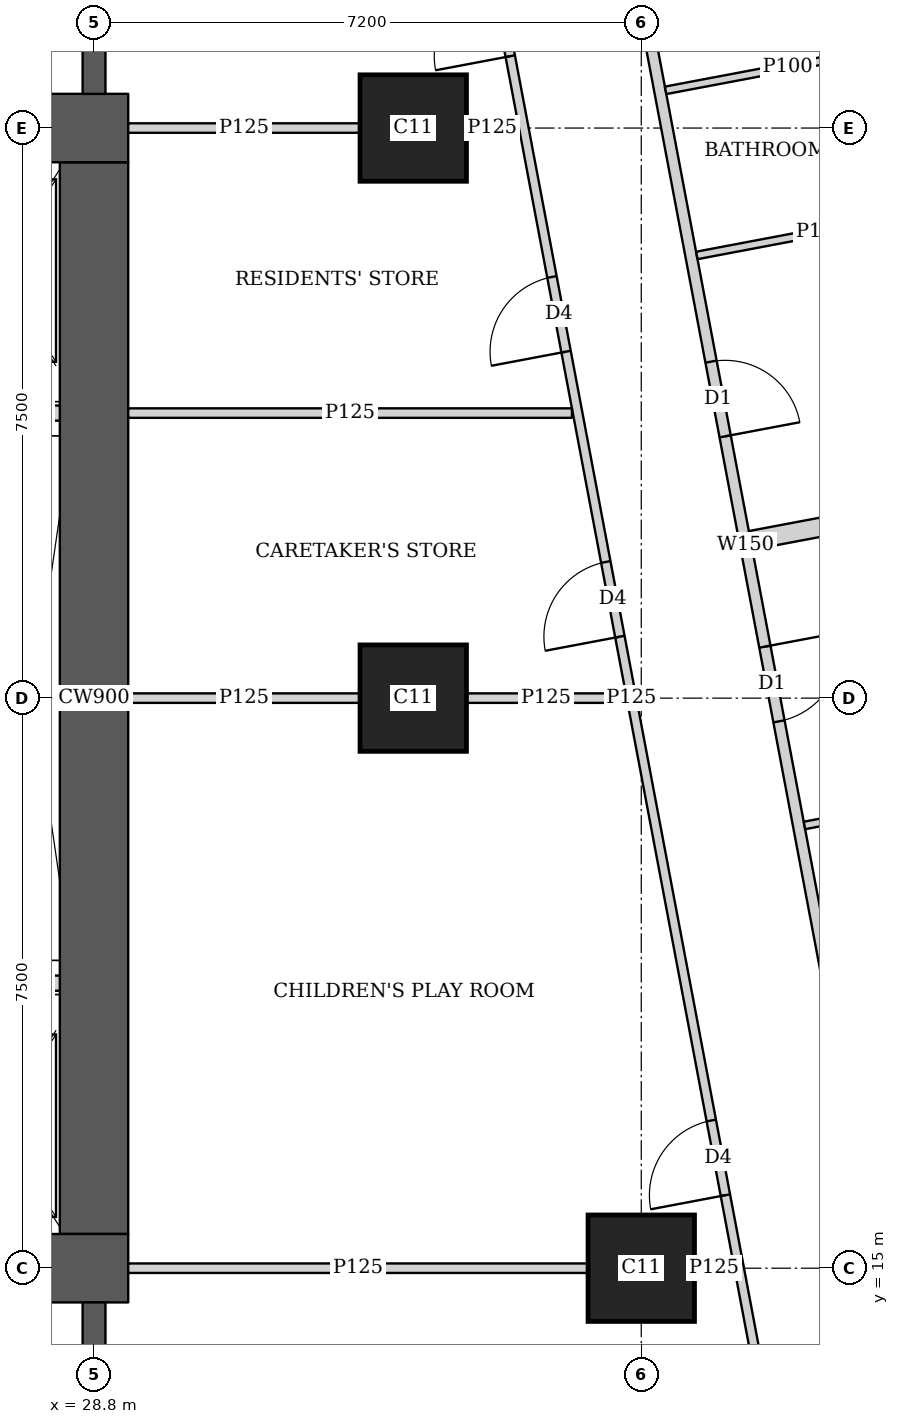
"""IFC4 building model, lengths in metres.
Left out: names, types, materials, properties, quantities, classifications, styles, units other than length and angle.
Written with IfcOpenShell. Run it as: python <this file> out.ifc"""

import sys

from ifc_helpers import new_model, si_unit, direction, frame, frame_2d, origin, origin_2d, place, context, subcontext, project, spatial, rectangle, extrude, element, fill, save


model = new_model("IFC4")
c1 = context("Model", 3, precision=1e-05, world=origin(), true_north=direction((0.0, 1.0)))
c2 = subcontext(c1, "Body", "Model", "MODEL_VIEW")
j1 = project(units=[si_unit("LENGTHUNIT", "METRE"), si_unit("PLANEANGLEUNIT", "RADIAN")], contexts=[c1])
p1 = place(None, origin())
s1 = spatial("IfcSite", under=j1, at=p1, CompositionType="ELEMENT")
p2 = place(p1, origin())
s2 = spatial("IfcBuilding", under=s1, at=p2, CompositionType="ELEMENT")
p3 = place(p2, frame((0.0, 0.0, 266.6)))
s3 = spatial("IfcBuildingStorey", under=s2, at=p3, CompositionType="ELEMENT", Elevation=266.6)
for number, where, z_axis, x_axis in (
    (1, (36.0, 15.0, 0.0), (0.0, 0.0, 1.0), (1.0, 0.0, 0.0)),
    (2, (33.0, 22.5, 0.0), (0.0, 0.0, 1.0), (1.0, 0.0, 0.0)),
    (3, (33.0, 30.0, 0.0), (0.0, 0.0, 1.0), (1.0, 0.0, 0.0)),
):
    element("IfcColumn", number, at=place(p3, frame(where, z_axis=z_axis, x_axis=x_axis)), inside=s3, PredefinedType="COLUMN", context=c2, shape_type="SweptSolid", body=[
        extrude(rectangle(XDim=1.4, YDim=1.4, at=origin_2d()), origin(), (0.0, 0.0, 1.0), 3.75),
    ])
p4 = place(p3, frame((13.95, 15.0, 0.0), z_axis=(0.0, 0.0, 1.0), x_axis=(1.0, 0.0, 0.0)))
e4 = element("IfcWall", 4, at=p4, inside=s3, PredefinedType="SHEAR", context=c2, shape_type="SweptSolid", body=[
    extrude(rectangle(XDim=15.3, YDim=0.9, at=frame_2d((7.65, 0.0))), origin(), (0.0, 0.0, 1.0), 3.75),
])
p5 = place(p4, frame((4.45, 0.0, 0.0)))
e5 = element("IfcOpeningElement", 5, at=p5, cuts=e4, PredefinedType="OPENING", context=c2, shape_type="SweptSolid", body=[
    extrude(rectangle(XDim=1.8, YDim=2.1, at=frame_2d((0.9, 1.05))), frame((0.0, 0.46, 0.0), z_axis=(0.0, -1.0, 0.0), x_axis=(1.0, 0.0, 0.0)), (0.0, 0.0, 1.0), 0.92),
])
p6 = place(p4, frame((10.7, 0.0, 0.0)))
e6 = element("IfcOpeningElement", 6, at=p6, cuts=e4, PredefinedType="OPENING", context=c2, shape_type="SweptSolid", body=[
    extrude(rectangle(XDim=1.1, YDim=2.1, at=frame_2d((0.55, 1.05))), frame((0.0, 0.46, 0.0), z_axis=(0.0, -1.0, 0.0), x_axis=(1.0, 0.0, 0.0)), (0.0, 0.0, 1.0), 0.92),
])
p7 = place(p3, frame((13.95, 30.0, 0.0), z_axis=(0.0, 0.0, 1.0), x_axis=(1.0, 0.0, 0.0)))
e7 = element("IfcWall", 7, at=p7, inside=s3, PredefinedType="SHEAR", context=c2, shape_type="SweptSolid", body=[
    extrude(rectangle(XDim=15.3, YDim=0.9, at=frame_2d((7.65, 0.0))), origin(), (0.0, 0.0, 1.0), 3.75),
])
p8 = place(p7, frame((4.45, 0.0, 0.0)))
e8 = element("IfcOpeningElement", 8, at=p8, cuts=e7, PredefinedType="OPENING", context=c2, shape_type="SweptSolid", body=[
    extrude(rectangle(XDim=1.8, YDim=2.1, at=frame_2d((0.9, 1.05))), frame((0.0, 0.46, 0.0), z_axis=(0.0, -1.0, 0.0), x_axis=(1.0, 0.0, 0.0)), (0.0, 0.0, 1.0), 0.92),
])
p9 = place(p7, frame((10.7, 0.0, 0.0)))
e9 = element("IfcOpeningElement", 9, at=p9, cuts=e7, PredefinedType="OPENING", context=c2, shape_type="SweptSolid", body=[
    extrude(rectangle(XDim=1.1, YDim=2.1, at=frame_2d((0.55, 1.05))), frame((0.0, 0.46, 0.0), z_axis=(0.0, -1.0, 0.0), x_axis=(1.0, 0.0, 0.0)), (0.0, 0.0, 1.0), 0.92),
])
p10 = place(p3, frame((28.8, 15.45, 0.0), z_axis=(0.0, 0.0, 1.0), x_axis=(0.0, 1.0, 0.0)))
e10 = element("IfcWall", 10, at=p10, inside=s3, PredefinedType="SHEAR", context=c2, shape_type="SweptSolid", body=[
    extrude(rectangle(XDim=14.1, YDim=0.9, at=frame_2d((7.05, 0.0))), origin(), (0.0, 0.0, 1.0), 3.75),
])
for number, where, z_axis, x_axis in (
    (11, (28.8, 10.35, 0.0), (0.0, 0.0, 1.0), (0.0, 1.0, 0.0)),
    (12, (28.8, 30.45, 0.0), (0.0, 0.0, 1.0), (0.0, 1.0, 0.0)),
):
    element("IfcWall", number, at=place(p3, frame(where, z_axis=z_axis, x_axis=x_axis)), inside=s3, PredefinedType="SHEAR", context=c2, shape_type="SweptSolid", body=[
        extrude(rectangle(XDim=4.2, YDim=0.3, at=frame_2d((2.1, 0.0))), origin(), (0.0, 0.0, 1.0), 3.75),
    ])
p11 = place(p3, frame((34.036, 42.186, 0.0), z_axis=(0.0, 0.0, 1.0), x_axis=(0.185593518645, -0.9826266055, 0.0)))
e13 = element("IfcWall", 13, at=p11, inside=s3, PredefinedType="SOLIDWALL", context=c2, shape_type="SweptSolid", body=[
    extrude(rectangle(XDim=35.961, YDim=0.15, at=frame_2d((17.98, 0.0))), origin(), (0.0, 0.0, 1.0), 2.5),
])
p12 = place(p11, frame((15.529, 0.0, 0.0)))
e14 = element("IfcOpeningElement", 14, at=p12, cuts=e13, PredefinedType="OPENING", context=c2, shape_type="SweptSolid", body=[
    extrude(rectangle(XDim=1.0, YDim=2.1, at=frame_2d((0.5, 1.05))), frame((0.0, 0.085, 0.0), z_axis=(0.0, -1.0, 0.0), x_axis=(1.0, 0.0, 0.0)), (0.0, 0.0, 1.0), 0.17),
])
p13 = place(p11, frame((19.345, 0.0, 0.0)))
e15 = element("IfcOpeningElement", 15, at=p13, cuts=e13, PredefinedType="OPENING", context=c2, shape_type="SweptSolid", body=[
    extrude(rectangle(XDim=1.0, YDim=2.1, at=frame_2d((0.5, 1.05))), frame((0.0, 0.085, 0.0), z_axis=(0.0, -1.0, 0.0), x_axis=(1.0, 0.0, 0.0)), (0.0, 0.0, 1.0), 0.17),
])
p14 = place(p11, frame((30.594, 0.0, 0.0)))
e16 = element("IfcOpeningElement", 16, at=p14, cuts=e13, PredefinedType="OPENING", context=c2, shape_type="SweptSolid", body=[
    extrude(rectangle(XDim=1.0, YDim=2.1, at=frame_2d((0.5, 1.05))), frame((0.0, 0.085, 0.0), z_axis=(0.0, -1.0, 0.0), x_axis=(1.0, 0.0, 0.0)), (0.0, 0.0, 1.0), 0.17),
])
p15 = place(p3, frame((37.511, 42.109, 0.0), z_axis=(0.0, 0.0, 1.0), x_axis=(0.185550464988, -0.982634736279, 0.0)))
e17 = element("IfcWall", 17, at=p15, inside=s3, PredefinedType="PARTITIONING", context=c2, shape_type="SweptSolid", body=[
    extrude(rectangle(XDim=13.35, YDim=0.1, at=frame_2d((6.675, 0.0))), origin(), (0.0, 0.0, 1.0), 2.5),
])
p16 = place(p15, frame((11.845, 0.0, 0.0)))
e18 = element("IfcOpeningElement", 18, at=p16, cuts=e17, PredefinedType="OPENING", context=c2, shape_type="SweptSolid", body=[
    extrude(rectangle(XDim=0.9, YDim=2.1, at=frame_2d((0.45, 1.05))), frame((0.0, 0.06, 0.0), z_axis=(0.0, -1.0, 0.0), x_axis=(1.0, 0.0, 0.0)), (0.0, 0.0, 1.0), 0.12),
])
p17 = place(p15, frame((8.224, 0.0, 0.0)))
e19 = element("IfcOpeningElement", 19, at=p17, cuts=e17, PredefinedType="OPENING", context=c2, shape_type="SweptSolid", body=[
    extrude(rectangle(XDim=0.9, YDim=2.1, at=frame_2d((0.45, 1.05))), frame((0.0, 0.06, 0.0), z_axis=(0.0, -1.0, 0.0), x_axis=(1.0, 0.0, 0.0)), (0.0, 0.0, 1.0), 0.12),
])
p18 = place(p15, frame((2.65, 0.0, 0.0)))
e20 = element("IfcOpeningElement", 20, at=p18, cuts=e17, PredefinedType="OPENING", context=c2, shape_type="SweptSolid", body=[
    extrude(rectangle(XDim=0.9, YDim=2.1, at=frame_2d((0.45, 1.05))), frame((0.0, 0.06, 0.0), z_axis=(0.0, -1.0, 0.0), x_axis=(1.0, 0.0, 0.0)), (0.0, 0.0, 1.0), 0.12),
])
p19 = place(p15, frame((9.936, 0.0, 0.0)))
e21 = element("IfcOpeningElement", 21, at=p19, cuts=e17, PredefinedType="OPENING", context=c2, shape_type="SweptSolid", body=[
    extrude(rectangle(XDim=0.9, YDim=2.1, at=frame_2d((0.45, 1.05))), frame((0.0, 0.06, 0.0), z_axis=(0.0, -1.0, 0.0), x_axis=(1.0, 0.0, 0.0)), (0.0, 0.0, 1.0), 0.12),
])
p20 = place(p15, frame((5.555, 0.0, 0.0)))
e22 = element("IfcOpeningElement", 22, at=p20, cuts=e17, PredefinedType="OPENING", context=c2, shape_type="SweptSolid", body=[
    extrude(rectangle(XDim=0.9, YDim=2.1, at=frame_2d((0.45, 1.05))), frame((0.0, 0.06, 0.0), z_axis=(0.0, -1.0, 0.0), x_axis=(1.0, 0.0, 0.0)), (0.0, 0.0, 1.0), 0.12),
])
p21 = place(p3, frame((39.997, 28.942, 0.0), z_axis=(0.0, 0.0, 1.0), x_axis=(-0.982569883123, -0.185893584556, 0.0)))
e23 = element("IfcWall", 23, at=p21, inside=s3, PredefinedType="PARTITIONING", context=c2, shape_type="SweptSolid", body=[
    extrude(rectangle(XDim=3.324, YDim=0.1, at=frame_2d((1.662, 0.0))), origin(), (0.0, 0.0, 1.0), 3.5),
])
p22 = place(p3, frame((39.538, 31.104, 0.0), z_axis=(0.0, 0.0, 1.0), x_axis=(-0.982620626894, -0.185625169636, 0.0)))
e24 = element("IfcWall", 24, at=p22, inside=s3, PredefinedType="PARTITIONING", context=c2, shape_type="SweptSolid", body=[
    extrude(rectangle(XDim=3.275, YDim=0.1, at=frame_2d((1.637, 0.0))), origin(), (0.0, 0.0, 1.0), 2.5),
])
p23 = place(p3, frame((41.365, 21.433, 0.0), z_axis=(0.0, 0.0, 1.0), x_axis=(-0.982607026909, -0.185697147715, 0.0)))
e25 = element("IfcWall", 25, at=p23, inside=s3, PredefinedType="PARTITIONING", context=c2, shape_type="SweptSolid", body=[
    extrude(rectangle(XDim=3.275, YDim=0.1, at=frame_2d((1.637, 0.0))), origin(), (0.0, 0.0, 1.0), 3.5),
])
p24 = place(p3, frame((41.885, 25.415, 0.0), z_axis=(0.0, 0.0, 1.0), x_axis=(-0.982612837616, -0.185666398014, 0.0)))
e26 = element("IfcWall", 26, at=p24, inside=s3, PredefinedType="SOLIDWALL", context=c2, shape_type="SweptSolid", body=[
    extrude(rectangle(XDim=4.525, YDim=0.25, at=frame_2d((2.262, 0.0))), origin(), (0.0, 0.0, 1.0), 3.5),
])
p25 = place(p3, frame((38.202, 10.163, 0.0), z_axis=(0.0, 0.0, 1.0), x_axis=(-0.185610321132, 0.982623431783, 0.0)))
e27 = element("IfcWall", 27, at=p25, inside=s3, PredefinedType="PARTITIONING", context=c2, shape_type="SweptSolid", body=[
    extrude(rectangle(XDim=25.111, YDim=0.125, at=frame_2d((12.556, 0.0))), origin(), (0.0, 0.0, 1.0), 2.5),
])
p26 = place(p25, frame((0.708, 0.0, 0.0)))
e28 = element("IfcOpeningElement", 28, at=p26, cuts=e27, PredefinedType="OPENING", context=c2, shape_type="SweptSolid", body=[
    extrude(rectangle(XDim=1.0, YDim=2.1, at=frame_2d((0.5, 1.05))), frame((0.0, 0.073, 0.0), z_axis=(0.0, -1.0, 0.0), x_axis=(1.0, 0.0, 0.0)), (0.0, 0.0, 1.0), 0.145),
])
p27 = place(p25, frame((5.9, 0.0, 0.0)))
e29 = element("IfcOpeningElement", 29, at=p27, cuts=e27, PredefinedType="OPENING", context=c2, shape_type="SweptSolid", body=[
    extrude(rectangle(XDim=1.0, YDim=2.1, at=frame_2d((0.5, 1.05))), frame((0.0, 0.073, 0.0), z_axis=(0.0, -1.0, 0.0), x_axis=(1.0, 0.0, 0.0)), (0.0, 0.0, 1.0), 0.145),
])
p28 = place(p25, frame((13.378, 0.0, 0.0)))
e30 = element("IfcOpeningElement", 30, at=p28, cuts=e27, PredefinedType="OPENING", context=c2, shape_type="SweptSolid", body=[
    extrude(rectangle(XDim=1.0, YDim=2.1, at=frame_2d((0.5, 1.05))), frame((0.0, 0.073, 0.0), z_axis=(0.0, -1.0, 0.0), x_axis=(1.0, 0.0, 0.0)), (0.0, 0.0, 1.0), 0.145),
])
p29 = place(p25, frame((17.194, 0.0, 0.0)))
e31 = element("IfcOpeningElement", 31, at=p29, cuts=e27, PredefinedType="OPENING", context=c2, shape_type="SweptSolid", body=[
    extrude(rectangle(XDim=1.0, YDim=2.1, at=frame_2d((0.5, 1.05))), frame((0.0, 0.073, 0.0), z_axis=(0.0, -1.0, 0.0), x_axis=(1.0, 0.0, 0.0)), (0.0, 0.0, 1.0), 0.145),
])
p30 = place(p25, frame((21.15, 0.0, 0.0)))
e32 = element("IfcOpeningElement", 32, at=p30, cuts=e27, PredefinedType="OPENING", context=c2, shape_type="SweptSolid", body=[
    extrude(rectangle(XDim=1.0, YDim=2.1, at=frame_2d((0.5, 1.05))), frame((0.0, 0.073, 0.0), z_axis=(0.0, -1.0, 0.0), x_axis=(1.0, 0.0, 0.0)), (0.0, 0.0, 1.0), 0.145),
])
p31 = place(p3, frame((29.25, 15.0, 0.0), z_axis=(0.0, 0.0, 1.0), x_axis=(1.0, 0.0, 0.0)))
e33 = element("IfcWall", 33, at=p31, inside=s3, PredefinedType="PARTITIONING", context=c2, shape_type="SweptSolid", body=[
    extrude(rectangle(XDim=6.049, YDim=0.125, at=frame_2d((3.024, 0.0))), origin(), (0.0, 0.0, 1.0), 3.5),
])
p32 = place(p3, frame((36.701, 15.0, 0.0), z_axis=(0.0, 0.0, 1.0), x_axis=(1.0, 0.0, 0.0)))
e34 = element("IfcWall", 34, at=p32, inside=s3, PredefinedType="PARTITIONING", context=c2, shape_type="SweptSolid", body=[
    extrude(rectangle(XDim=0.512, YDim=0.125, at=frame_2d((0.256, 0.0))), origin(), (0.0, 0.0, 1.0), 3.5),
])
p33 = place(p3, frame((29.25, 22.5, 0.0), z_axis=(0.0, 0.0, 1.0), x_axis=(1.0, 0.0, 0.0)))
e35 = element("IfcWall", 35, at=p33, inside=s3, PredefinedType="PARTITIONING", context=c2, shape_type="SweptSolid", body=[
    extrude(rectangle(XDim=3.049, YDim=0.125, at=frame_2d((1.524, 0.0))), origin(), (0.0, 0.0, 1.0), 3.5),
])
p34 = place(p3, frame((33.701, 22.5, 0.0), z_axis=(0.0, 0.0, 1.0), x_axis=(1.0, 0.0, 0.0)))
e36 = element("IfcWall", 36, at=p34, inside=s3, PredefinedType="PARTITIONING", context=c2, shape_type="SweptSolid", body=[
    extrude(rectangle(XDim=2.095, YDim=0.125, at=frame_2d((1.047, 0.0))), origin(), (0.0, 0.0, 1.0), 2.5),
])
p35 = place(p3, frame((29.25, 26.25, 0.0), z_axis=(0.0, 0.0, 1.0), x_axis=(1.0, 0.0, 0.0)))
e37 = element("IfcWall", 37, at=p35, inside=s3, PredefinedType="PARTITIONING", context=c2, shape_type="SweptSolid", body=[
    extrude(rectangle(XDim=5.838, YDim=0.125, at=frame_2d((2.919, 0.0))), origin(), (0.0, 0.0, 1.0), 3.5),
])
p36 = place(p3, frame((29.25, 30.0, 0.0), z_axis=(0.0, 0.0, 1.0), x_axis=(1.0, 0.0, 0.0)))
e38 = element("IfcWall", 38, at=p36, inside=s3, PredefinedType="PARTITIONING", context=c2, shape_type="SweptSolid", body=[
    extrude(rectangle(XDim=3.049, YDim=0.125, at=frame_2d((1.524, 0.0))), origin(), (0.0, 0.0, 1.0), 3.5),
])
p37 = place(p3, frame((33.701, 30.0, 0.0), z_axis=(0.0, 0.0, 1.0), x_axis=(1.0, 0.0, 0.0)))
e39 = element("IfcWall", 39, at=p37, inside=s3, PredefinedType="PARTITIONING", context=c2, shape_type="SweptSolid", body=[
    extrude(rectangle(XDim=0.678, YDim=0.125, at=frame_2d((0.339, 0.0))), origin(), (0.0, 0.0, 1.0), 2.5),
])
for number, where, z_axis, x_axis in (
    (40, (27.4, 18.75, 0.0), (0.0, 0.0, 1.0), (1.0, 0.0, 0.0)),
    (41, (27.4, 26.25, 0.0), (0.0, 0.0, 1.0), (1.0, 0.0, 0.0)),
):
    element("IfcWall", number, at=place(p3, frame(where, z_axis=z_axis, x_axis=x_axis)), inside=s3, PredefinedType="SOLIDWALL", context=c2, shape_type="SweptSolid", body=[
        extrude(rectangle(XDim=0.95, YDim=0.2, at=frame_2d((0.475, 0.0))), origin(), (0.0, 0.0, 1.0), 3.5),
    ])
p38 = place(p12, origin())
e42 = element("IfcDoor", 42, at=p38, inside=s3, OperationType="SINGLE_SWING_RIGHT", PredefinedType="DOOR", context=c2, shape_type="SweptSolid", body=[
    extrude(rectangle(XDim=1.0, YDim=2.1, at=frame_2d((0.5, 1.05))), frame((0.0, 0.025, 0.0), z_axis=(0.0, -1.0, 0.0), x_axis=(1.0, 0.0, 0.0)), (0.0, 0.0, 1.0), 0.05),
])
fill(e14, e42)
p39 = place(p13, origin())
e43 = element("IfcDoor", 43, at=p39, inside=s3, OperationType="SINGLE_SWING_LEFT", PredefinedType="DOOR", context=c2, shape_type="SweptSolid", body=[
    extrude(rectangle(XDim=1.0, YDim=2.1, at=frame_2d((0.5, 1.05))), frame((0.0, 0.025, 0.0), z_axis=(0.0, -1.0, 0.0), x_axis=(1.0, 0.0, 0.0)), (0.0, 0.0, 1.0), 0.05),
])
fill(e15, e43)
p40 = place(p27, origin())
e44 = element("IfcDoor", 44, at=p40, inside=s3, OperationType="SINGLE_SWING_LEFT", PredefinedType="DOOR", context=c2, shape_type="SweptSolid", body=[
    extrude(rectangle(XDim=1.0, YDim=2.1, at=frame_2d((0.5, 1.05))), frame((0.0, 0.025, 0.0), z_axis=(0.0, -1.0, 0.0), x_axis=(1.0, 0.0, 0.0)), (0.0, 0.0, 1.0), 0.05),
])
fill(e29, e44)
p41 = place(p28, origin())
e45 = element("IfcDoor", 45, at=p41, inside=s3, OperationType="SINGLE_SWING_LEFT", PredefinedType="DOOR", context=c2, shape_type="SweptSolid", body=[
    extrude(rectangle(XDim=1.0, YDim=2.1, at=frame_2d((0.5, 1.05))), frame((0.0, 0.025, 0.0), z_axis=(0.0, -1.0, 0.0), x_axis=(1.0, 0.0, 0.0)), (0.0, 0.0, 1.0), 0.05),
])
fill(e30, e45)
p42 = place(p29, origin())
e46 = element("IfcDoor", 46, at=p42, inside=s3, OperationType="SINGLE_SWING_LEFT", PredefinedType="DOOR", context=c2, shape_type="SweptSolid", body=[
    extrude(rectangle(XDim=1.0, YDim=2.1, at=frame_2d((0.5, 1.05))), frame((0.0, 0.025, 0.0), z_axis=(0.0, -1.0, 0.0), x_axis=(1.0, 0.0, 0.0)), (0.0, 0.0, 1.0), 0.05),
])
fill(e31, e46)
p43 = place(p30, origin())
e47 = element("IfcDoor", 47, at=p43, inside=s3, OperationType="SINGLE_SWING_LEFT", PredefinedType="DOOR", context=c2, shape_type="SweptSolid", body=[
    extrude(rectangle(XDim=1.0, YDim=2.1, at=frame_2d((0.5, 1.05))), frame((0.0, 0.025, 0.0), z_axis=(0.0, -1.0, 0.0), x_axis=(1.0, 0.0, 0.0)), (0.0, 0.0, 1.0), 0.05),
])
fill(e32, e47)
save(model, sys.argv[1])
